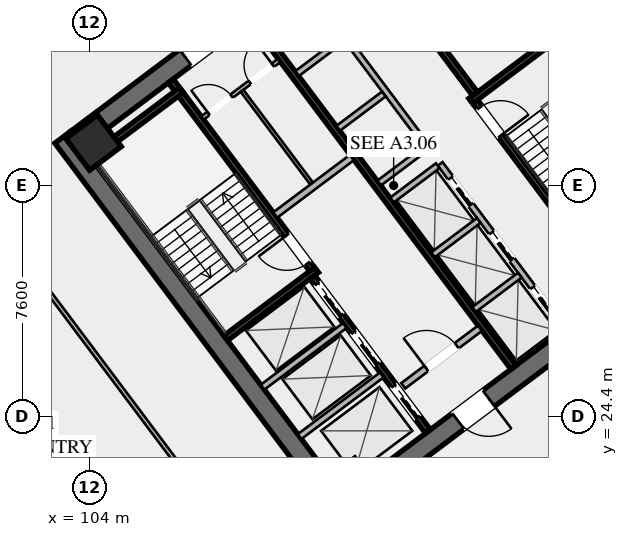
"""IFC4 building model, lengths in metres.
Left out: names, types, materials, properties, quantities, classifications, styles, units other than length and angle.
Written with IfcOpenShell. Run it as: python <this file> out.ifc"""

import sys

from ifc_helpers import new_model, si_unit, direction, frame, frame_2d, origin, origin_2d, place, context, subcontext, project, spatial, rectangle, hollow_rectangle, extrude, element, fill, save


model = new_model("IFC4")
c1 = context("Model", 3, precision=1e-05, world=origin(), true_north=direction((0.0, 1.0)))
c2 = subcontext(c1, "Body", "Model", "MODEL_VIEW")
j1 = project(units=[si_unit("LENGTHUNIT", "METRE"), si_unit("PLANEANGLEUNIT", "RADIAN")], contexts=[c1])
p1 = place(None, origin())
s1 = spatial("IfcSite", under=j1, at=p1, CompositionType="ELEMENT")
p2 = place(p1, origin())
s2 = spatial("IfcBuilding", under=s1, at=p2, CompositionType="ELEMENT")
p3 = place(p2, frame((0.0, 0.0, 67.2)))
s3 = spatial("IfcBuildingStorey", under=s2, at=p3, CompositionType="ELEMENT", Elevation=67.2)
for number, where, z_axis, x_axis in (
    (1, (112.476, 21.107, 0.0), (0.0, 0.0, 1.0), (-0.6, 0.8, 0.0)),
    (2, (115.524, 42.893, 0.0), (0.0, 0.0, 1.0), (0.6, -0.8, 0.0)),
):
    element("IfcWall", number, at=place(p3, frame(where, z_axis=z_axis, x_axis=x_axis)), inside=s3, PredefinedType="SHEAR", context=c2, shape_type="SweptSolid", body=[
        extrude(rectangle(XDim=15.6, YDim=0.65, at=frame_2d((7.8, 0.0))), origin(), (0.0, 0.0, 1.0), 3.55),
    ])
p4 = place(p3, frame((124.429, 30.478, 0.0), z_axis=(0.0, 0.0, 1.0), x_axis=(-0.799998028465, -0.600002628705, 0.0)))
e3 = element("IfcWall", 3, at=p4, inside=s3, PredefinedType="SHEAR", context=c2, shape_type="SweptSolid", body=[
    extrude(rectangle(XDim=14.86, YDim=0.65, at=frame_2d((7.43, 0.0))), origin(), (0.0, 0.0, 1.0), 3.55),
])
p5 = place(p4, frame((9.13, 0.0, 0.0)))
e4 = element("IfcOpeningElement", 4, at=p5, cuts=e3, PredefinedType="OPENING", context=c2, shape_type="SweptSolid", body=[
    extrude(rectangle(XDim=1.25, YDim=2.25, at=frame_2d((0.625, 1.125))), frame((0.0, 0.335, 0.0), z_axis=(0.0, -1.0, 0.0), x_axis=(1.0, 0.0, 0.0)), (0.0, 0.0, 1.0), 0.67),
])
p6 = place(p4, frame((4.08, 0.0, 0.0)))
e5 = element("IfcOpeningElement", 5, at=p6, cuts=e3, PredefinedType="OPENING", context=c2, shape_type="SweptSolid", body=[
    extrude(rectangle(XDim=1.25, YDim=2.25, at=frame_2d((0.625, 1.125))), frame((0.0, 0.335, 0.0), z_axis=(0.0, -1.0, 0.0), x_axis=(1.0, 0.0, 0.0)), (0.0, 0.0, 1.0), 0.67),
])
p7 = place(p3, frame((103.571, 33.522, 0.0), z_axis=(0.0, 0.0, 1.0), x_axis=(0.799998028465, 0.600002628705, 0.0)))
e6 = element("IfcWall", 6, at=p7, inside=s3, PredefinedType="SHEAR", context=c2, shape_type="SweptSolid", body=[
    extrude(rectangle(XDim=14.86, YDim=0.65, at=frame_2d((7.43, 0.0))), origin(), (0.0, 0.0, 1.0), 3.55),
])
p8 = place(p7, frame((4.48, 0.0, 0.0)))
e7 = element("IfcOpeningElement", 7, at=p8, cuts=e6, PredefinedType="OPENING", context=c2, shape_type="SweptSolid", body=[
    extrude(rectangle(XDim=1.25, YDim=2.25, at=frame_2d((0.625, 1.125))), frame((0.0, 0.335, 0.0), z_axis=(0.0, -1.0, 0.0), x_axis=(1.0, 0.0, 0.0)), (0.0, 0.0, 1.0), 0.67),
])
p9 = place(p7, frame((9.53, 0.0, 0.0)))
e8 = element("IfcOpeningElement", 8, at=p9, cuts=e6, PredefinedType="OPENING", context=c2, shape_type="SweptSolid", body=[
    extrude(rectangle(XDim=1.25, YDim=2.25, at=frame_2d((0.625, 1.125))), frame((0.0, 0.335, 0.0), z_axis=(0.0, -1.0, 0.0), x_axis=(1.0, 0.0, 0.0)), (0.0, 0.0, 1.0), 0.67),
])
p10 = place(p3, frame((104.13, 33.41, 0.0), z_axis=(0.0, 0.0, 1.0), x_axis=(0.799999996291, 0.600000004945, 0.0)))
e9 = element("IfcColumn", 9, at=p10, inside=s3, PredefinedType="COLUMN", context=c2, shape_type="SweptSolid", body=[
    extrude(hollow_rectangle(XDim=1.3, YDim=1.3, WallThickness=0.05, at=origin_2d()), origin(), (0.0, 0.0, 1.0), 3.35),
])
p11 = place(p3, frame((111.44, 29.08, 0.0), z_axis=(0.0, 0.0, 1.0), x_axis=(-0.600009827119, 0.799992629566, 0.0)))
e10 = element("IfcWall", 10, at=p11, inside=s3, PredefinedType="SHEAR", context=c2, shape_type="SweptSolid", body=[
    extrude(rectangle(XDim=7.95, YDim=0.2, at=frame_2d((3.975, 0.0))), origin(), (0.0, 0.0, 1.0), 3.35),
])
p12 = place(p11, frame((0.45, 0.0, 0.0)))
e11 = element("IfcOpeningElement", 11, at=p12, cuts=e10, PredefinedType="OPENING", context=c2, shape_type="SweptSolid", body=[
    extrude(rectangle(XDim=1.15, YDim=2.2, at=frame_2d((0.575, 1.1))), frame((0.0, 0.11, 0.0), z_axis=(0.0, -1.0, 0.0), x_axis=(1.0, 0.0, 0.0)), (0.0, 0.0, 1.0), 0.22),
])
for number, where, z_axis, x_axis in (
    (12, (108.476, 26.982, 0.0), (0.0, 0.0, 1.0), (0.8, 0.6, 0.0)),
    (13, (104.036, 32.902, 0.0), (0.0, 0.0, 1.0), (0.8, 0.6, 0.0)),
):
    element("IfcWall", number, at=place(p3, frame(where, z_axis=z_axis, x_axis=x_axis)), inside=s3, PredefinedType="SHEAR", context=c2, shape_type="SweptSolid", body=[
        extrude(rectangle(XDim=3.73, YDim=0.2, at=frame_2d((1.865, 0.0))), origin(), (0.0, 0.0, 1.0), 3.35),
    ])
p13 = place(p3, frame((116.56, 34.92, 0.0), z_axis=(0.0, 0.0, 1.0), x_axis=(0.600009827119, -0.799992629566, 0.0)))
e14 = element("IfcWall", 14, at=p13, inside=s3, PredefinedType="SHEAR", context=c2, shape_type="SweptSolid", body=[
    extrude(rectangle(XDim=7.95, YDim=0.2, at=frame_2d((3.975, 0.0))), origin(), (0.0, 0.0, 1.0), 3.35),
])
p14 = place(p13, frame((0.45, 0.0, 0.0)))
e15 = element("IfcOpeningElement", 15, at=p14, cuts=e14, PredefinedType="OPENING", context=c2, shape_type="SweptSolid", body=[
    extrude(rectangle(XDim=1.15, YDim=2.2, at=frame_2d((0.575, 1.1))), frame((0.0, 0.11, 0.0), z_axis=(0.0, -1.0, 0.0), x_axis=(1.0, 0.0, 0.0)), (0.0, 0.0, 1.0), 0.22),
])
p15 = place(p3, frame((116.54, 34.78, 0.0), z_axis=(0.0, 0.0, 1.0), x_axis=(0.799984290658, 0.600020945218, 0.0)))
e16 = element("IfcWall", 16, at=p15, inside=s3, PredefinedType="SHEAR", context=c2, shape_type="SweptSolid", body=[
    extrude(rectangle(XDim=3.73, YDim=0.2, at=frame_2d((1.865, 0.0))), origin(), (0.0, 0.0, 1.0), 3.35),
])
p16 = place(p3, frame((117.938, 26.016, 0.0), z_axis=(0.0, 0.0, 1.0), x_axis=(-0.600005463273, 0.799995902516, 0.0)))
e17 = element("IfcWall", 17, at=p16, inside=s3, PredefinedType="SHEAR", context=c2, shape_type="SweptSolid", body=[
    extrude(rectangle(XDim=14.3, YDim=0.2, at=frame_2d((7.15, 0.0))), origin(), (0.0, 0.0, 1.0), 3.35),
])
p17 = place(p3, frame((110.104, 31.028, 0.0), z_axis=(0.0, 0.0, 1.0), x_axis=(0.800018601094, 0.59997519774, 0.0)))
e18 = element("IfcWall", 18, at=p17, inside=s3, PredefinedType="SOLIDWALL", context=c2, shape_type="SweptSolid", body=[
    extrude(rectangle(XDim=3.15, YDim=0.22, at=frame_2d((1.575, 0.0))), origin(), (0.0, 0.0, 1.0), 2.703),
])
p18 = place(p3, frame((114.316, 25.412, 0.0), z_axis=(0.0, 0.0, 1.0), x_axis=(0.800018601094, 0.59997519774, 0.0)))
e19 = element("IfcWall", 19, at=p18, inside=s3, PredefinedType="SOLIDWALL", context=c2, shape_type="SweptSolid", body=[
    extrude(rectangle(XDim=3.15, YDim=0.22, at=frame_2d((1.575, 0.0))), origin(), (0.0, 0.0, 1.0), 2.703),
])
p19 = place(p18, frame((0.95, 0.0, 0.0)))
e20 = element("IfcOpeningElement", 20, at=p19, cuts=e19, PredefinedType="OPENING", context=c2, shape_type="SweptSolid", body=[
    extrude(rectangle(XDim=1.25, YDim=2.25, at=frame_2d((0.625, 1.125))), frame((0.0, 0.12, 0.0), z_axis=(0.0, -1.0, 0.0), x_axis=(1.0, 0.0, 0.0)), (0.0, 0.0, 1.0), 0.24),
])
p20 = place(p3, frame((115.13, 23.91, 0.0), z_axis=(0.0, 0.0, 1.0), x_axis=(-0.599975393228, 0.800018454488, 0.0)))
e21 = element("IfcWall", 21, at=p20, inside=s3, PredefinedType="SHEAR", context=c2, shape_type="SweptSolid", body=[
    extrude(rectangle(XDim=6.35, YDim=0.2, at=frame_2d((3.175, 0.0))), origin(), (0.0, 0.0, 1.0), 3.35),
])
p21 = place(p20, frame((4.775, 0.0, 0.0)))
e22 = element("IfcOpeningElement", 22, at=p21, cuts=e21, PredefinedType="OPENING", context=c2, shape_type="SweptSolid", body=[
    extrude(rectangle(XDim=1.3, YDim=2.25, at=frame_2d((0.65, 1.125))), frame((0.0, 0.11, 0.0), z_axis=(0.0, -1.0, 0.0), x_axis=(1.0, 0.0, 0.0)), (0.0, 0.0, 1.0), 0.22),
])
p22 = place(p20, frame((2.775, 0.0, 0.0)))
e23 = element("IfcOpeningElement", 23, at=p22, cuts=e21, PredefinedType="OPENING", context=c2, shape_type="SweptSolid", body=[
    extrude(rectangle(XDim=1.3, YDim=2.25, at=frame_2d((0.65, 1.125))), frame((0.0, 0.11, 0.0), z_axis=(0.0, -1.0, 0.0), x_axis=(1.0, 0.0, 0.0)), (0.0, 0.0, 1.0), 0.22),
])
p23 = place(p20, frame((0.575, 0.0, 0.0)))
e24 = element("IfcOpeningElement", 24, at=p23, cuts=e21, PredefinedType="OPENING", context=c2, shape_type="SweptSolid", body=[
    extrude(rectangle(XDim=1.3, YDim=2.25, at=frame_2d((0.65, 1.125))), frame((0.0, 0.11, 0.0), z_axis=(0.0, -1.0, 0.0), x_axis=(1.0, 0.0, 0.0)), (0.0, 0.0, 1.0), 0.22),
])
for number, where, z_axis, x_axis in (
    (25, (110.906, 23.742, 0.0), (0.0, 0.0, 1.0), (0.8, 0.6, 0.0)),
    (26, (109.688, 25.366, 0.0), (0.0, 0.0, 1.0), (0.8, 0.6, 0.0)),
):
    element("IfcWall", number, at=place(p3, frame(where, z_axis=z_axis, x_axis=x_axis)), inside=s3, PredefinedType="SOLIDWALL", context=c2, shape_type="SweptSolid", body=[
        extrude(rectangle(XDim=3.38, YDim=0.2, at=frame_2d((1.69, 0.0))), origin(), (0.0, 0.0, 1.0), 3.35),
    ])
p24 = place(p3, frame((112.87, 40.09, 0.0), z_axis=(0.0, 0.0, 1.0), x_axis=(0.599975393228, -0.800018454488, 0.0)))
e27 = element("IfcWall", 27, at=p24, inside=s3, PredefinedType="SHEAR", context=c2, shape_type="SweptSolid", body=[
    extrude(rectangle(XDim=6.35, YDim=0.2, at=frame_2d((3.175, 0.0))), origin(), (0.0, 0.0, 1.0), 3.35),
])
p25 = place(p3, frame((107.71, 34.22, 0.0), z_axis=(0.0, 0.0, 1.0), x_axis=(0.799981399002, 0.60002480053, 0.0)))
e28 = element("IfcWall", 28, at=p25, inside=s3, PredefinedType="PARTITIONING", context=c2, shape_type="SweptSolid", body=[
    extrude(rectangle(XDim=3.15, YDim=0.135, at=frame_2d((1.575, 0.0))), origin(), (0.0, 0.0, 1.0), 2.703),
])
p26 = place(p25, frame((0.25, 0.0, 0.0)))
e29 = element("IfcOpeningElement", 29, at=p26, cuts=e28, PredefinedType="OPENING", context=c2, shape_type="SweptSolid", body=[
    extrude(rectangle(XDim=0.95, YDim=2.05, at=frame_2d((0.475, 1.025))), frame((0.0, 0.077, 0.0), z_axis=(0.0, -1.0, 0.0), x_axis=(1.0, 0.0, 0.0)), (0.0, 0.0, 1.0), 0.155),
])
p27 = place(p25, frame((1.95, 0.0, 0.0)))
e30 = element("IfcOpeningElement", 30, at=p27, cuts=e28, PredefinedType="OPENING", context=c2, shape_type="SweptSolid", body=[
    extrude(rectangle(XDim=0.95, YDim=2.05, at=frame_2d((0.475, 1.025))), frame((0.0, 0.077, 0.0), z_axis=(0.0, -1.0, 0.0), x_axis=(1.0, 0.0, 0.0)), (0.0, 0.0, 1.0), 0.155),
])
p28 = place(p3, frame((111.296, 32.072, 0.0), z_axis=(0.0, 0.0, 1.0), x_axis=(-0.59995887973, 0.800030838552, 0.0)))
e31 = element("IfcWall", 31, at=p28, inside=s3, PredefinedType="PARTITIONING", context=c2, shape_type="SweptSolid", body=[
    extrude(rectangle(XDim=3.8, YDim=0.11, at=frame_2d((1.9, 0.0))), origin(), (0.0, 0.0, 1.0), 2.703),
])
p29 = place(p3, frame((119.61, 27.27, 0.0), z_axis=(0.0, 0.0, 1.0), x_axis=(-0.600011488909, 0.79999138319, 0.0)))
e32 = element("IfcWall", 32, at=p29, inside=s3, PredefinedType="SOLIDWALL", context=c2, shape_type="SweptSolid", body=[
    extrude(rectangle(XDim=6.8, YDim=0.2, at=frame_2d((3.4, 0.0))), origin(), (0.0, 0.0, 1.0), 3.35),
])
p30 = place(p29, frame((0.625, 0.0, 0.0)))
e33 = element("IfcOpeningElement", 33, at=p30, cuts=e32, PredefinedType="OPENING", context=c2, shape_type="SweptSolid", body=[
    extrude(rectangle(XDim=1.1, YDim=2.2, at=frame_2d((0.55, 1.1))), frame((0.0, 0.11, 0.0), z_axis=(0.0, -1.0, 0.0), x_axis=(1.0, 0.0, 0.0)), (0.0, 0.0, 1.0), 0.22),
])
p31 = place(p29, frame((2.875, 0.0, 0.0)))
e34 = element("IfcOpeningElement", 34, at=p31, cuts=e32, PredefinedType="OPENING", context=c2, shape_type="SweptSolid", body=[
    extrude(rectangle(XDim=1.1, YDim=2.2, at=frame_2d((0.55, 1.1))), frame((0.0, 0.11, 0.0), z_axis=(0.0, -1.0, 0.0), x_axis=(1.0, 0.0, 0.0)), (0.0, 0.0, 1.0), 0.22),
])
p32 = place(p29, frame((5.125, 0.0, 0.0)))
e35 = element("IfcOpeningElement", 35, at=p32, cuts=e32, PredefinedType="OPENING", context=c2, shape_type="SweptSolid", body=[
    extrude(rectangle(XDim=1.1, YDim=2.2, at=frame_2d((0.55, 1.1))), frame((0.0, 0.11, 0.0), z_axis=(0.0, -1.0, 0.0), x_axis=(1.0, 0.0, 0.0)), (0.0, 0.0, 1.0), 0.22),
])
p33 = place(p3, frame((116.646, 27.922, 0.0), z_axis=(0.0, 0.0, 1.0), x_axis=(0.8, 0.6, 0.0)))
e36 = element("IfcWall", 36, at=p33, inside=s3, PredefinedType="SOLIDWALL", context=c2, shape_type="SweptSolid", body=[
    extrude(rectangle(XDim=1.88, YDim=0.2, at=frame_2d((0.94, 0.0))), origin(), (0.0, 0.0, 1.0), 3.35),
])
p34 = place(p3, frame((115.296, 29.722, 0.0), z_axis=(0.0, 0.0, 1.0), x_axis=(0.799984418148, 0.600020775241, 0.0)))
e37 = element("IfcWall", 37, at=p34, inside=s3, PredefinedType="SOLIDWALL", context=c2, shape_type="SweptSolid", body=[
    extrude(rectangle(XDim=1.88, YDim=0.2, at=frame_2d((0.94, 0.0))), origin(), (0.0, 0.0, 1.0), 3.35),
])
p35 = place(p3, frame((113.946, 31.522, 0.0), z_axis=(0.0, 0.0, 1.0), x_axis=(0.8, 0.6, 0.0)))
e38 = element("IfcWall", 38, at=p35, inside=s3, PredefinedType="SOLIDWALL", context=c2, shape_type="SweptSolid", body=[
    extrude(rectangle(XDim=1.88, YDim=0.2, at=frame_2d((0.94, 0.0))), origin(), (0.0, 0.0, 1.0), 3.35),
])
p36 = place(p3, frame((115.11, 33.27, 0.0), z_axis=(0.0, 0.0, 1.0), x_axis=(-0.600011488909, 0.79999138319, 0.0)))
e39 = element("IfcWall", 39, at=p36, inside=s3, PredefinedType="SOLIDWALL", context=c2, shape_type="SweptSolid", body=[
    extrude(rectangle(XDim=6.8, YDim=0.2, at=frame_2d((3.4, 0.0))), origin(), (0.0, 0.0, 1.0), 3.35),
])
p37 = place(p3, frame((113.526, 32.082, 0.0), z_axis=(0.0, 0.0, 1.0), x_axis=(0.800046745961, 0.599937666993, 0.0)))
e40 = element("IfcWall", 40, at=p37, inside=s3, PredefinedType="SOLIDWALL", context=c2, shape_type="SweptSolid", body=[
    extrude(rectangle(XDim=1.88, YDim=0.2, at=frame_2d((0.94, 0.0))), origin(), (0.0, 0.0, 1.0), 3.35),
])
p38 = place(p3, frame((112.176, 33.882, 0.0), z_axis=(0.0, 0.0, 1.0), x_axis=(0.8, 0.6, 0.0)))
e41 = element("IfcWall", 41, at=p38, inside=s3, PredefinedType="SOLIDWALL", context=c2, shape_type="SweptSolid", body=[
    extrude(rectangle(XDim=1.88, YDim=0.2, at=frame_2d((0.94, 0.0))), origin(), (0.0, 0.0, 1.0), 3.35),
])
p39 = place(p3, frame((110.826, 35.682, 0.0), z_axis=(0.0, 0.0, 1.0), x_axis=(0.799984418148, 0.600020775241, 0.0)))
e42 = element("IfcWall", 42, at=p39, inside=s3, PredefinedType="SOLIDWALL", context=c2, shape_type="SweptSolid", body=[
    extrude(rectangle(XDim=1.88, YDim=0.2, at=frame_2d((0.94, 0.0))), origin(), (0.0, 0.0, 1.0), 3.35),
])
p40 = place(p3, frame((98.516, 34.012, 0.0), z_axis=(0.0, 0.0, 1.0), x_axis=(0.8, 0.6, 0.0)))
e43 = element("IfcWall", 43, at=p40, inside=s3, PredefinedType="PARTITIONING", context=c2, shape_type="SweptSolid", body=[
    extrude(rectangle(XDim=28.23, YDim=0.135, at=frame_2d((14.115, 0.0))), origin(), (0.0, 0.0, 1.0), 2.703),
])
p41 = place(p40, frame((0.3, 0.0, 0.0)))
e44 = element("IfcOpeningElement", 44, at=p41, cuts=e43, PredefinedType="OPENING", context=c2, shape_type="SweptSolid", body=[
    extrude(rectangle(XDim=0.95, YDim=2.05, at=frame_2d((0.475, 1.025))), frame((0.0, 0.077, 0.0), z_axis=(0.0, -1.0, 0.0), x_axis=(1.0, 0.0, 0.0)), (0.0, 0.0, 1.0), 0.155),
])
p42 = place(p40, frame((6.84, 0.0, 0.0)))
e45 = element("IfcOpeningElement", 45, at=p42, cuts=e43, PredefinedType="OPENING", context=c2, shape_type="SweptSolid", body=[
    extrude(rectangle(XDim=0.95, YDim=2.05, at=frame_2d((0.475, 1.025))), frame((0.0, 0.077, 0.0), z_axis=(0.0, -1.0, 0.0), x_axis=(1.0, 0.0, 0.0)), (0.0, 0.0, 1.0), 0.155),
])
p43 = place(p40, frame((10.863, 0.0, 0.0)))
e46 = element("IfcOpeningElement", 46, at=p43, cuts=e43, PredefinedType="OPENING", context=c2, shape_type="SweptSolid", body=[
    extrude(rectangle(XDim=0.95, YDim=2.05, at=frame_2d((0.475, 1.025))), frame((0.0, 0.077, 0.0), z_axis=(0.0, -1.0, 0.0), x_axis=(1.0, 0.0, 0.0)), (0.0, 0.0, 1.0), 0.155),
])
p44 = place(p40, frame((26.98, 0.0, 0.0)))
e47 = element("IfcOpeningElement", 47, at=p44, cuts=e43, PredefinedType="OPENING", context=c2, shape_type="SweptSolid", body=[
    extrude(rectangle(XDim=0.95, YDim=2.05, at=frame_2d((0.475, 1.025))), frame((0.0, 0.077, 0.0), z_axis=(0.0, -1.0, 0.0), x_axis=(1.0, 0.0, 0.0)), (0.0, 0.0, 1.0), 0.155),
])
p45 = place(p3, frame((134.18, 33.51, 0.0), z_axis=(0.0, 0.0, 1.0), x_axis=(-0.8, -0.6, 0.0)))
e48 = element("IfcWall", 48, at=p45, inside=s3, PredefinedType="PARTITIONING", context=c2, shape_type="SweptSolid", body=[
    extrude(rectangle(XDim=28.23, YDim=0.135, at=frame_2d((14.115, 0.0))), origin(), (0.0, 0.0, 1.0), 2.703),
])
p46 = place(p45, frame((26.9, 0.0, 0.0)))
e49 = element("IfcOpeningElement", 49, at=p46, cuts=e48, PredefinedType="OPENING", context=c2, shape_type="SweptSolid", body=[
    extrude(rectangle(XDim=0.95, YDim=2.05, at=frame_2d((0.475, 1.025))), frame((0.0, 0.077, 0.0), z_axis=(0.0, -1.0, 0.0), x_axis=(1.0, 0.0, 0.0)), (0.0, 0.0, 1.0), 0.155),
])
p47 = place(p45, frame((20.399, 0.0, 0.0)))
e50 = element("IfcOpeningElement", 50, at=p47, cuts=e48, PredefinedType="OPENING", context=c2, shape_type="SweptSolid", body=[
    extrude(rectangle(XDim=0.95, YDim=2.05, at=frame_2d((0.475, 1.025))), frame((0.0, 0.077, 0.0), z_axis=(0.0, -1.0, 0.0), x_axis=(1.0, 0.0, 0.0)), (0.0, 0.0, 1.0), 0.155),
])
p48 = place(p45, frame((16.339, 0.0, 0.0)))
e51 = element("IfcOpeningElement", 51, at=p48, cuts=e48, PredefinedType="OPENING", context=c2, shape_type="SweptSolid", body=[
    extrude(rectangle(XDim=0.95, YDim=2.05, at=frame_2d((0.475, 1.025))), frame((0.0, 0.077, 0.0), z_axis=(0.0, -1.0, 0.0), x_axis=(1.0, 0.0, 0.0)), (0.0, 0.0, 1.0), 0.155),
])
p49 = place(p45, frame((0.38, 0.0, 0.0)))
e52 = element("IfcOpeningElement", 52, at=p49, cuts=e48, PredefinedType="OPENING", context=c2, shape_type="SweptSolid", body=[
    extrude(rectangle(XDim=0.95, YDim=2.05, at=frame_2d((0.475, 1.025))), frame((0.0, 0.077, 0.0), z_axis=(0.0, -1.0, 0.0), x_axis=(1.0, 0.0, 0.0)), (0.0, 0.0, 1.0), 0.155),
])
p50 = place(p3, frame((111.548, 16.636, 0.0), z_axis=(0.0, 0.0, 1.0), x_axis=(-0.600003610192, 0.799997292343, 0.0)))
e53 = element("IfcWall", 53, at=p50, inside=s3, PredefinedType="PARTITIONING", context=c2, shape_type="SweptSolid", body=[
    extrude(rectangle(XDim=21.64, YDim=0.135, at=frame_2d((10.82, 0.0))), origin(), (0.0, 0.0, 1.0), 2.703),
])
p51 = place(p50, frame((0.3, 0.0, 0.0)))
e54 = element("IfcOpeningElement", 54, at=p51, cuts=e53, PredefinedType="OPENING", context=c2, shape_type="SweptSolid", body=[
    extrude(rectangle(XDim=0.95, YDim=2.05, at=frame_2d((0.475, 1.025))), frame((0.0, 0.077, 0.0), z_axis=(0.0, -1.0, 0.0), x_axis=(1.0, 0.0, 0.0)), (0.0, 0.0, 1.0), 0.155),
])
p52 = place(p8, origin())
e55 = element("IfcDoor", 55, at=p52, inside=s3, OperationType="SINGLE_SWING_LEFT", PredefinedType="DOOR", context=c2, shape_type="SweptSolid", body=[
    extrude(rectangle(XDim=1.25, YDim=2.25, at=frame_2d((0.625, 1.125))), frame((0.0, 0.025, 0.0), z_axis=(0.0, -1.0, 0.0), x_axis=(1.0, 0.0, 0.0)), (0.0, 0.0, 1.0), 0.05),
])
fill(e7, e55)
p53 = place(p5, origin())
e56 = element("IfcDoor", 56, at=p53, inside=s3, OperationType="SINGLE_SWING_LEFT", PredefinedType="DOOR", context=c2, shape_type="SweptSolid", body=[
    extrude(rectangle(XDim=1.25, YDim=2.25, at=frame_2d((0.625, 1.125))), frame((0.0, 0.025, 0.0), z_axis=(0.0, -1.0, 0.0), x_axis=(1.0, 0.0, 0.0)), (0.0, 0.0, 1.0), 0.05),
])
fill(e4, e56)
p54 = place(p12, origin())
e57 = element("IfcDoor", 57, at=p54, inside=s3, OperationType="SINGLE_SWING_RIGHT", PredefinedType="DOOR", context=c2, shape_type="SweptSolid", body=[
    extrude(rectangle(XDim=1.15, YDim=2.2, at=frame_2d((0.575, 1.1))), frame((0.0, 0.025, 0.0), z_axis=(0.0, -1.0, 0.0), x_axis=(1.0, 0.0, 0.0)), (0.0, 0.0, 1.0), 0.05),
])
fill(e11, e57)
p55 = place(p14, origin())
e58 = element("IfcDoor", 58, at=p55, inside=s3, OperationType="SINGLE_SWING_RIGHT", PredefinedType="DOOR", context=c2, shape_type="SweptSolid", body=[
    extrude(rectangle(XDim=1.15, YDim=2.2, at=frame_2d((0.575, 1.1))), frame((0.0, 0.025, 0.0), z_axis=(0.0, -1.0, 0.0), x_axis=(1.0, 0.0, 0.0)), (0.0, 0.0, 1.0), 0.05),
])
fill(e15, e58)
p56 = place(p19, origin())
e59 = element("IfcDoor", 59, at=p56, inside=s3, OperationType="SINGLE_SWING_LEFT", PredefinedType="DOOR", context=c2, shape_type="SweptSolid", body=[
    extrude(rectangle(XDim=1.25, YDim=2.25, at=frame_2d((0.625, 1.125))), frame((0.0, 0.025, 0.0), z_axis=(0.0, -1.0, 0.0), x_axis=(1.0, 0.0, 0.0)), (0.0, 0.0, 1.0), 0.05),
])
fill(e20, e59)
p57 = place(p26, origin())
e60 = element("IfcDoor", 60, at=p57, inside=s3, OperationType="SINGLE_SWING_LEFT", PredefinedType="DOOR", context=c2, shape_type="SweptSolid", body=[
    extrude(rectangle(XDim=0.95, YDim=2.05, at=frame_2d((0.475, 1.025))), frame((0.0, 0.025, 0.0), z_axis=(0.0, -1.0, 0.0), x_axis=(1.0, 0.0, 0.0)), (0.0, 0.0, 1.0), 0.05),
])
fill(e29, e60)
p58 = place(p27, origin())
e61 = element("IfcDoor", 61, at=p58, inside=s3, OperationType="SINGLE_SWING_RIGHT", PredefinedType="DOOR", context=c2, shape_type="SweptSolid", body=[
    extrude(rectangle(XDim=0.95, YDim=2.05, at=frame_2d((0.475, 1.025))), frame((0.0, 0.025, 0.0), z_axis=(0.0, -1.0, 0.0), x_axis=(1.0, 0.0, 0.0)), (0.0, 0.0, 1.0), 0.05),
])
fill(e30, e61)
p59 = place(p21, origin())
e62 = element("IfcDoor", 62, at=p59, inside=s3, OperationType="SLIDING_TO_LEFT", PredefinedType="DOOR", context=c2, shape_type="SweptSolid", body=[
    extrude(rectangle(XDim=1.3, YDim=2.25, at=frame_2d((0.65, 1.125))), frame((0.0, 0.025, 0.0), z_axis=(0.0, -1.0, 0.0), x_axis=(1.0, 0.0, 0.0)), (0.0, 0.0, 1.0), 0.05),
])
fill(e22, e62)
p60 = place(p22, origin())
e63 = element("IfcDoor", 63, at=p60, inside=s3, OperationType="SLIDING_TO_LEFT", PredefinedType="DOOR", context=c2, shape_type="SweptSolid", body=[
    extrude(rectangle(XDim=1.3, YDim=2.25, at=frame_2d((0.65, 1.125))), frame((0.0, 0.025, 0.0), z_axis=(0.0, -1.0, 0.0), x_axis=(1.0, 0.0, 0.0)), (0.0, 0.0, 1.0), 0.05),
])
fill(e23, e63)
p61 = place(p23, origin())
e64 = element("IfcDoor", 64, at=p61, inside=s3, OperationType="SLIDING_TO_LEFT", PredefinedType="DOOR", context=c2, shape_type="SweptSolid", body=[
    extrude(rectangle(XDim=1.3, YDim=2.25, at=frame_2d((0.65, 1.125))), frame((0.0, 0.025, 0.0), z_axis=(0.0, -1.0, 0.0), x_axis=(1.0, 0.0, 0.0)), (0.0, 0.0, 1.0), 0.05),
])
fill(e24, e64)
p62 = place(p30, origin())
e65 = element("IfcDoor", 65, at=p62, inside=s3, OperationType="SLIDING_TO_LEFT", PredefinedType="DOOR", context=c2, shape_type="SweptSolid", body=[
    extrude(rectangle(XDim=1.1, YDim=2.2, at=frame_2d((0.55, 1.1))), frame((0.0, 0.025, 0.0), z_axis=(0.0, -1.0, 0.0), x_axis=(1.0, 0.0, 0.0)), (0.0, 0.0, 1.0), 0.05),
])
fill(e33, e65)
p63 = place(p31, origin())
e66 = element("IfcDoor", 66, at=p63, inside=s3, OperationType="SLIDING_TO_LEFT", PredefinedType="DOOR", context=c2, shape_type="SweptSolid", body=[
    extrude(rectangle(XDim=1.1, YDim=2.2, at=frame_2d((0.55, 1.1))), frame((0.0, 0.025, 0.0), z_axis=(0.0, -1.0, 0.0), x_axis=(1.0, 0.0, 0.0)), (0.0, 0.0, 1.0), 0.05),
])
fill(e34, e66)
p64 = place(p32, origin())
e67 = element("IfcDoor", 67, at=p64, inside=s3, OperationType="SLIDING_TO_LEFT", PredefinedType="DOOR", context=c2, shape_type="SweptSolid", body=[
    extrude(rectangle(XDim=1.1, YDim=2.2, at=frame_2d((0.55, 1.1))), frame((0.0, 0.025, 0.0), z_axis=(0.0, -1.0, 0.0), x_axis=(1.0, 0.0, 0.0)), (0.0, 0.0, 1.0), 0.05),
])
fill(e35, e67)
save(model, sys.argv[1])
